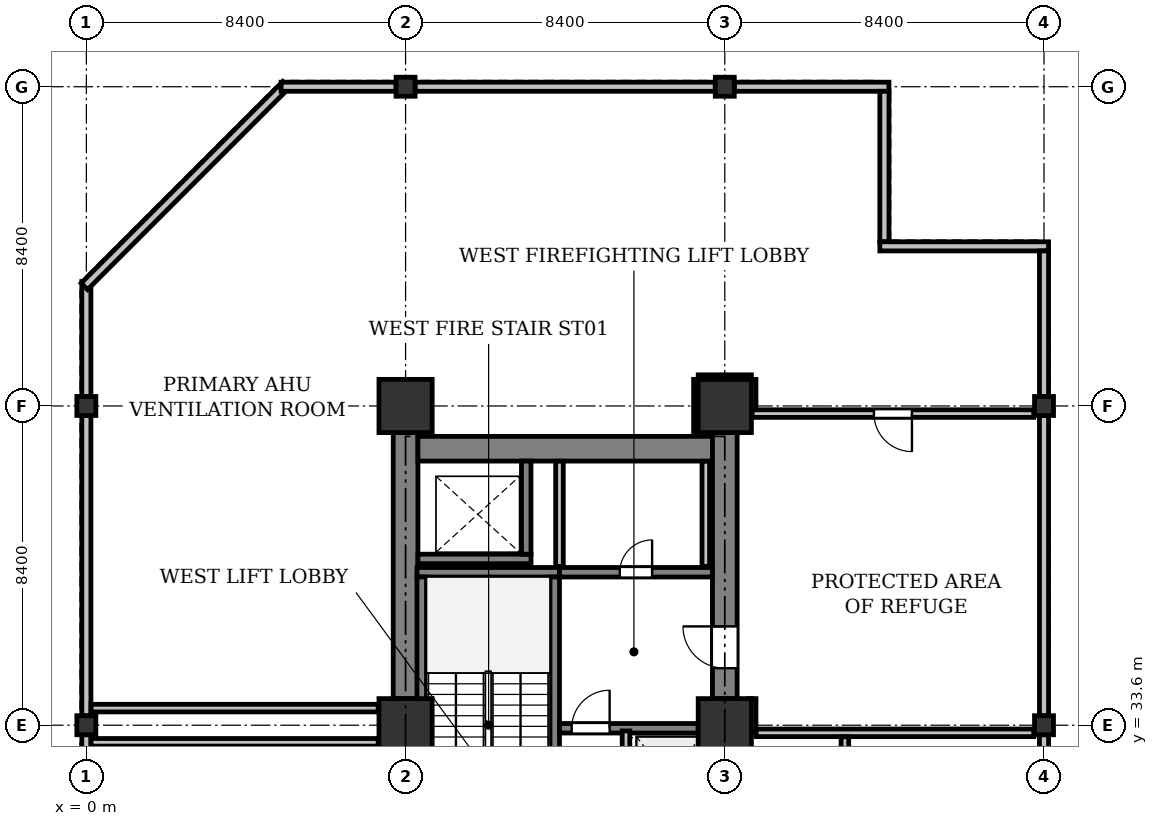
"""IFC4 building model, lengths in metres.
Left out: names, types, materials, properties, quantities, classifications, styles, units other than length and angle.
Written with IfcOpenShell. Run it as: python <this file> out.ifc"""

import sys

from ifc_helpers import new_model, si_unit, direction, frame, frame_2d, origin, origin_2d, place, context, subcontext, project, spatial, rectangle, i_section, extrude, element, fill, save


model = new_model("IFC4")
c1 = context("Model", 3, precision=1e-05, world=origin(), true_north=direction((0.0, 1.0)))
c2 = subcontext(c1, "Body", "Model", "MODEL_VIEW")
j1 = project(units=[si_unit("LENGTHUNIT", "METRE"), si_unit("PLANEANGLEUNIT", "RADIAN")], contexts=[c1])
p1 = place(None, origin())
s1 = spatial("IfcSite", under=j1, at=p1, CompositionType="ELEMENT")
p2 = place(p1, origin())
s2 = spatial("IfcBuilding", under=s1, at=p2, CompositionType="ELEMENT")
p3 = place(p2, frame((0.0, 0.0, 79.4)))
s3 = spatial("IfcBuildingStorey", under=s2, at=p3, CompositionType="ELEMENT", Elevation=79.4)
for number, where, z_axis, x_axis in (
    (1, (0.0, 33.6, 0.0), (0.0, 0.0, 1.0), (1.0, 0.0, 0.0)),
    (2, (0.0, 42.0, 0.0), (0.0, 0.0, 1.0), (1.0, 0.0, 0.0)),
):
    element("IfcColumn", number, at=place(p3, frame(where, z_axis=z_axis, x_axis=x_axis)), inside=s3, PredefinedType="COLUMN", context=c2, shape_type="SweptSolid", body=[
        extrude(i_section(OverallWidth=0.5, OverallDepth=0.5, WebThickness=0.028, FlangeThickness=0.04, at=origin_2d()), origin(), (0.0, 0.0, 1.0), 5.0),
    ])
for number, where, z_axis, x_axis in (
    (3, (8.4, 33.6, 0.0), (0.0, 0.0, 1.0), (1.0, 0.0, 0.0)),
    (4, (8.4, 42.0, 0.0), (0.0, 0.0, 1.0), (1.0, 0.0, 0.0)),
):
    element("IfcColumn", number, at=place(p3, frame(where, z_axis=z_axis, x_axis=x_axis)), inside=s3, PredefinedType="COLUMN", context=c2, shape_type="SweptSolid", body=[
        extrude(rectangle(XDim=1.4, YDim=1.4, at=origin_2d()), origin(), (0.0, 0.0, 1.0), 5.0),
    ])
p4 = place(p3, frame((8.4, 50.4, 0.0), z_axis=(0.0, 0.0, 1.0), x_axis=(1.0, 0.0, 0.0)))
e5 = element("IfcColumn", 5, at=p4, inside=s3, PredefinedType="COLUMN", context=c2, shape_type="SweptSolid", body=[
    extrude(i_section(OverallWidth=0.5, OverallDepth=0.5, WebThickness=0.028, FlangeThickness=0.04, at=origin_2d()), origin(), (0.0, 0.0, 1.0), 5.0),
])
for number, where, z_axis, x_axis in (
    (6, (16.8, 33.6, 0.0), (0.0, 0.0, 1.0), (1.0, 0.0, 0.0)),
    (7, (16.8, 42.0, 0.0), (0.0, 0.0, 1.0), (1.0, 0.0, 0.0)),
):
    element("IfcColumn", number, at=place(p3, frame(where, z_axis=z_axis, x_axis=x_axis)), inside=s3, PredefinedType="COLUMN", context=c2, shape_type="SweptSolid", body=[
        extrude(rectangle(XDim=1.4, YDim=1.4, at=origin_2d()), origin(), (0.0, 0.0, 1.0), 5.0),
    ])
for number, where, z_axis, x_axis in (
    (8, (16.8, 50.4, 0.0), (0.0, 0.0, 1.0), (1.0, 0.0, 0.0)),
    (9, (25.2, 33.6, 0.0), (0.0, 0.0, 1.0), (1.0, 0.0, 0.0)),
    (10, (25.2, 42.0, 0.0), (0.0, 0.0, 1.0), (1.0, 0.0, 0.0)),
):
    element("IfcColumn", number, at=place(p3, frame(where, z_axis=z_axis, x_axis=x_axis)), inside=s3, PredefinedType="COLUMN", context=c2, shape_type="SweptSolid", body=[
        extrude(i_section(OverallWidth=0.5, OverallDepth=0.5, WebThickness=0.028, FlangeThickness=0.04, at=origin_2d()), origin(), (0.0, 0.0, 1.0), 5.0),
    ])
p5 = place(p3, frame((0.0, 25.45, 0.0), z_axis=(0.0, 0.0, 1.0), x_axis=(0.0, 1.0, 0.0)))
e11 = element("IfcWall", 11, at=p5, inside=s3, PredefinedType="STANDARD", context=c2, shape_type="SweptSolid", body=[
    extrude(rectangle(XDim=7.9, YDim=0.24, at=frame_2d((3.95, 0.0))), origin(), (0.0, 0.0, 1.0), 4.425),
])
p6 = place(p3, frame((0.0, 33.85, 0.0), z_axis=(0.0, 0.0, 1.0), x_axis=(0.0, 1.0, 0.0)))
e12 = element("IfcWall", 12, at=p6, inside=s3, PredefinedType="STANDARD", context=c2, shape_type="SweptSolid", body=[
    extrude(rectangle(XDim=7.9, YDim=0.24, at=frame_2d((3.95, 0.0))), origin(), (0.0, 0.0, 1.0), 4.425),
])
p7 = place(p3, frame((0.0, 42.25, 0.0), z_axis=(0.0, 0.0, 1.0), x_axis=(0.0, 1.0, 0.0)))
e13 = element("IfcWall", 13, at=p7, inside=s3, PredefinedType="STANDARD", context=c2, shape_type="SweptSolid", body=[
    extrude(rectangle(XDim=3.025, YDim=0.24, at=frame_2d((1.512, 0.0))), origin(), (0.0, 0.0, 1.0), 4.725),
])
p8 = place(p3, frame((-0.053, 45.147, 0.0), z_axis=(0.0, 0.0, 1.0), x_axis=(0.707090511833, 0.707123050166, 0.0)))
e14 = element("IfcWall", 14, at=p8, inside=s3, PredefinedType="STANDARD", context=c2, shape_type="SweptSolid", body=[
    extrude(rectangle(XDim=7.503, YDim=0.24, at=frame_2d((3.751, 0.0))), origin(), (0.0, 0.0, 1.0), 4.725),
])
p9 = place(p3, frame((5.125, 50.4, 0.0), z_axis=(0.0, 0.0, 1.0), x_axis=(1.0, 0.0, 0.0)))
e15 = element("IfcWall", 15, at=p9, inside=s3, PredefinedType="STANDARD", context=c2, shape_type="SweptSolid", body=[
    extrude(rectangle(XDim=3.025, YDim=0.24, at=frame_2d((1.512, 0.0))), origin(), (0.0, 0.0, 1.0), 4.725),
])
p10 = place(p3, frame((8.65, 50.4, 0.0), z_axis=(0.0, 0.0, 1.0), x_axis=(1.0, 0.0, 0.0)))
e16 = element("IfcWall", 16, at=p10, inside=s3, PredefinedType="STANDARD", context=c2, shape_type="SweptSolid", body=[
    extrude(rectangle(XDim=7.9, YDim=0.24, at=frame_2d((3.95, 0.0))), origin(), (0.0, 0.0, 1.0), 4.425),
])
p11 = place(p3, frame((17.05, 50.4, 0.0), z_axis=(0.0, 0.0, 1.0), x_axis=(1.0, 0.0, 0.0)))
e17 = element("IfcWall", 17, at=p11, inside=s3, PredefinedType="STANDARD", context=c2, shape_type="SweptSolid", body=[
    extrude(rectangle(XDim=4.07, YDim=0.24, at=frame_2d((2.035, 0.0))), origin(), (0.0, 0.0, 1.0), 4.725),
])
p12 = place(p3, frame((21.0, 50.28, 0.0), z_axis=(0.0, 0.0, 1.0), x_axis=(0.0, -1.0, 0.0)))
e18 = element("IfcWall", 18, at=p12, inside=s3, PredefinedType="STANDARD", context=c2, shape_type="SweptSolid", body=[
    extrude(rectangle(XDim=3.96, YDim=0.24, at=frame_2d((1.98, 0.0))), origin(), (0.0, 0.0, 1.0), 4.725),
])
p13 = place(p3, frame((20.88, 46.2, 0.0), z_axis=(0.0, 0.0, 1.0), x_axis=(1.0, 0.0, 0.0)))
e19 = element("IfcWall", 19, at=p13, inside=s3, PredefinedType="STANDARD", context=c2, shape_type="SweptSolid", body=[
    extrude(rectangle(XDim=4.44, YDim=0.24, at=frame_2d((2.22, 0.0))), origin(), (0.0, 0.0, 1.0), 4.725),
])
p14 = place(p3, frame((25.2, 46.08, 0.0), z_axis=(0.0, 0.0, 1.0), x_axis=(0.0, -1.0, 0.0)))
e20 = element("IfcWall", 20, at=p14, inside=s3, PredefinedType="STANDARD", context=c2, shape_type="SweptSolid", body=[
    extrude(rectangle(XDim=3.83, YDim=0.24, at=frame_2d((1.915, 0.0))), origin(), (0.0, 0.0, 1.0), 4.725),
])
p15 = place(p3, frame((25.2, 41.75, 0.0), z_axis=(0.0, 0.0, 1.0), x_axis=(0.0, -1.0, 0.0)))
e21 = element("IfcWall", 21, at=p15, inside=s3, PredefinedType="STANDARD", context=c2, shape_type="SweptSolid", body=[
    extrude(rectangle(XDim=7.9, YDim=0.24, at=frame_2d((3.95, 0.0))), origin(), (0.0, 0.0, 1.0), 3.709),
])
p16 = place(p3, frame((25.2, 33.35, 0.0), z_axis=(0.0, 0.0, 1.0), x_axis=(0.0, -1.0, 0.0)))
e22 = element("IfcWall", 22, at=p16, inside=s3, PredefinedType="STANDARD", context=c2, shape_type="SweptSolid", body=[
    extrude(rectangle(XDim=7.9, YDim=0.24, at=frame_2d((3.95, 0.0))), origin(), (0.0, 0.0, 1.0), 3.709),
])
p17 = place(p3, frame((8.4, 34.3, 0.0), z_axis=(0.0, 0.0, 1.0), x_axis=(0.0, 1.0, 0.0)))
e23 = element("IfcWall", 23, at=p17, inside=s3, PredefinedType="SHEAR", context=c2, shape_type="SweptSolid", body=[
    extrude(rectangle(XDim=7.0, YDim=0.65, at=frame_2d((3.5, 0.0))), origin(), (0.0, 0.0, 1.0), 4.725),
])
p18 = place(p3, frame((8.725, 40.875, 0.0), z_axis=(0.0, 0.0, 1.0), x_axis=(1.0, 0.0, 0.0)))
e24 = element("IfcWall", 24, at=p18, inside=s3, PredefinedType="SHEAR", context=c2, shape_type="SweptSolid", body=[
    extrude(rectangle(XDim=7.75, YDim=0.65, at=frame_2d((3.875, 0.0))), origin(), (0.0, 0.0, 1.0), 4.725),
])
p19 = place(p3, frame((16.8, 34.3, 0.0), z_axis=(0.0, 0.0, 1.0), x_axis=(0.0, 1.0, 0.0)))
e25 = element("IfcWall", 25, at=p19, inside=s3, PredefinedType="SHEAR", context=c2, shape_type="SweptSolid", body=[
    extrude(rectangle(XDim=7.0, YDim=0.65, at=frame_2d((3.5, 0.0))), origin(), (0.0, 0.0, 1.0), 4.725),
])
p20 = place(p19, frame((0.8, 0.0, 0.0)))
e26 = element("IfcOpeningElement", 26, at=p20, cuts=e25, PredefinedType="OPENING", context=c2, shape_type="SweptSolid", body=[
    extrude(rectangle(XDim=1.1, YDim=2.15, at=frame_2d((0.55, 1.075))), frame((0.0, 0.335, 0.0), z_axis=(0.0, -1.0, 0.0), x_axis=(1.0, 0.0, 0.0)), (0.0, 0.0, 1.0), 0.67),
])
p21 = place(p3, frame((12.45, 37.625, 0.0), z_axis=(0.0, 0.0, 1.0), x_axis=(-1.0, 0.0, 0.0)))
e27 = element("IfcWall", 27, at=p21, inside=s3, PredefinedType="SHEAR", context=c2, shape_type="SweptSolid", body=[
    extrude(rectangle(XDim=3.75, YDim=0.25, at=frame_2d((1.875, 0.0))), origin(), (0.0, 0.0, 1.0), 4.725),
])
p22 = place(p3, frame((12.325, 29.75, 0.0), z_axis=(0.0, 0.0, 1.0), x_axis=(0.0, 1.0, 0.0)))
e28 = element("IfcWall", 28, at=p22, inside=s3, PredefinedType="SHEAR", context=c2, shape_type="SweptSolid", body=[
    extrude(rectangle(XDim=7.75, YDim=0.25, at=frame_2d((3.875, 0.0))), origin(), (0.0, 0.0, 1.0), 4.725),
])
p23 = place(p22, frame((0.22, 0.0, 0.0)))
e29 = element("IfcOpeningElement", 29, at=p23, cuts=e28, PredefinedType="OPENING", context=c2, shape_type="SweptSolid", body=[
    extrude(rectangle(XDim=1.1, YDim=2.15, at=frame_2d((0.55, 1.075))), frame((0.0, 0.135, 0.0), z_axis=(0.0, -1.0, 0.0), x_axis=(1.0, 0.0, 0.0)), (0.0, 0.0, 1.0), 0.27),
])
p24 = place(p3, frame((8.825, 29.75, 0.0), z_axis=(0.0, 0.0, 1.0), x_axis=(0.0, 1.0, 0.0)))
e30 = element("IfcWall", 30, at=p24, inside=s3, PredefinedType="SHEAR", context=c2, shape_type="SweptSolid", body=[
    extrude(rectangle(XDim=7.75, YDim=0.25, at=frame_2d((3.875, 0.0))), origin(), (0.0, 0.0, 1.0), 4.725),
])
p25 = place(p3, frame((8.725, 37.975, 0.0), z_axis=(0.0, 0.0, 1.0), x_axis=(1.0, 0.0, 0.0)))
e31 = element("IfcWall", 31, at=p25, inside=s3, PredefinedType="SHEAR", context=c2, shape_type="SweptSolid", body=[
    extrude(rectangle(XDim=2.975, YDim=0.25, at=frame_2d((1.487, 0.0))), origin(), (0.0, 0.0, 1.0), 4.725),
])
p26 = place(p3, frame((11.575, 38.1, 0.0), z_axis=(0.0, 0.0, 1.0), x_axis=(0.0, 1.0, 0.0)))
e32 = element("IfcWall", 32, at=p26, inside=s3, PredefinedType="SHEAR", context=c2, shape_type="SweptSolid", body=[
    extrude(rectangle(XDim=2.45, YDim=0.25, at=frame_2d((1.225, 0.0))), origin(), (0.0, 0.0, 1.0), 4.725),
])
p27 = place(p3, frame((12.45, 33.52, 0.0), z_axis=(0.0, 0.0, 1.0), x_axis=(1.0, 0.0, 0.0)))
e33 = element("IfcWall", 33, at=p27, inside=s3, PredefinedType="SHEAR", context=c2, shape_type="SweptSolid", body=[
    extrude(rectangle(XDim=3.65, YDim=0.25, at=frame_2d((1.825, 0.0))), origin(), (0.0, 0.0, 1.0), 4.725),
])
p28 = place(p27, frame((0.32, 0.0, 0.0)))
e34 = element("IfcOpeningElement", 34, at=p28, cuts=e33, PredefinedType="OPENING", context=c2, shape_type="SweptSolid", body=[
    extrude(rectangle(XDim=1.0, YDim=2.15, at=frame_2d((0.5, 1.075))), frame((0.0, 0.135, 0.0), z_axis=(0.0, -1.0, 0.0), x_axis=(1.0, 0.0, 0.0)), (0.0, 0.0, 1.0), 0.27),
])
p29 = place(p3, frame((12.45, 37.625, 0.0), z_axis=(0.0, 0.0, 1.0), x_axis=(1.0, 0.0, 0.0)))
e35 = element("IfcWall", 35, at=p29, inside=s3, PredefinedType="SHEAR", context=c2, shape_type="SweptSolid", body=[
    extrude(rectangle(XDim=4.025, YDim=0.25, at=frame_2d((2.013, 0.0))), origin(), (0.0, 0.0, 1.0), 4.725),
])
p30 = place(p29, frame((1.587, 0.0, 0.0)))
e36 = element("IfcOpeningElement", 36, at=p30, cuts=e35, PredefinedType="OPENING", context=c2, shape_type="SweptSolid", body=[
    extrude(rectangle(XDim=0.85, YDim=2.15, at=frame_2d((0.425, 1.075))), frame((0.0, 0.135, 0.0), z_axis=(0.0, -1.0, 0.0), x_axis=(1.0, 0.0, 0.0)), (0.0, 0.0, 1.0), 0.27),
])
p31 = place(p3, frame((14.2, 30.95, 0.0), z_axis=(0.0, 0.0, 1.0), x_axis=(0.0, 1.0, 0.0)))
e37 = element("IfcWall", 37, at=p31, inside=s3, PredefinedType="PARTITIONING", context=c2, shape_type="SweptSolid", body=[
    extrude(rectangle(XDim=2.5, YDim=0.2, at=frame_2d((1.25, 0.0))), origin(), (0.0, 0.0, 1.0), 4.725),
])
p32 = place(p31, frame((0.7, 0.0, 0.0)))
e38 = element("IfcOpeningElement", 38, at=p32, cuts=e37, PredefinedType="OPENING", context=c2, shape_type="SweptSolid", body=[
    extrude(rectangle(XDim=1.1, YDim=2.2, at=frame_2d((0.55, 1.1))), frame((0.0, 0.11, 0.0), z_axis=(0.0, -1.0, 0.0), x_axis=(1.0, 0.0, 0.0)), (0.0, 0.0, 1.0), 0.22),
])
p33 = place(p3, frame((16.45, 31.05, 0.0), z_axis=(0.0, 0.0, 1.0), x_axis=(0.0, 1.0, 0.0)))
e39 = element("IfcWall", 39, at=p33, inside=s3, PredefinedType="PARTITIONING", context=c2, shape_type="SweptSolid", body=[
    extrude(rectangle(XDim=2.3, YDim=0.2, at=frame_2d((1.15, 0.0))), origin(), (0.0, 0.0, 1.0), 4.725),
])
for number, where, z_axis, x_axis in (
    (40, (16.3, 37.78, 0.0), (0.0, 0.0, 1.0), (0.0, 1.0, 0.0)),
    (41, (12.45, 40.546, 0.0), (0.0, 0.0, 1.0), (0.0, -1.0, 0.0)),
):
    element("IfcWall", number, at=place(p3, frame(where, z_axis=z_axis, x_axis=x_axis)), inside=s3, PredefinedType="PARTITIONING", context=c2, shape_type="SweptSolid", body=[
        extrude(rectangle(XDim=2.766, YDim=0.2, at=frame_2d((1.383, 0.0))), origin(), (0.0, 0.0, 1.0), 3.625),
    ])
p34 = place(p3, frame((17.52, 34.3, 0.0), z_axis=(0.0, 0.0, 1.0), x_axis=(0.0, -1.0, 0.0)))
e42 = element("IfcWall", 42, at=p34, inside=s3, PredefinedType="PARTITIONING", context=c2, shape_type="SweptSolid", body=[
    extrude(rectangle(XDim=0.9, YDim=0.2, at=frame_2d((0.45, 0.0))), origin(), (0.0, 0.0, 1.0), 3.825),
])
p35 = place(p3, frame((17.624, 33.4, 0.0), z_axis=(0.0, 0.0, 1.0), x_axis=(1.0, 0.0, 0.0)))
e43 = element("IfcWall", 43, at=p35, inside=s3, PredefinedType="PARTITIONING", context=c2, shape_type="SweptSolid", body=[
    extrude(rectangle(XDim=7.306, YDim=0.2, at=frame_2d((3.653, 0.0))), origin(), (0.0, 0.0, 1.0), 3.825),
])
p36 = place(p3, frame((24.93, 41.8, 0.0), z_axis=(0.0, 0.0, 1.0), x_axis=(-1.0, 0.0, 0.0)))
e44 = element("IfcWall", 44, at=p36, inside=s3, PredefinedType="PARTITIONING", context=c2, shape_type="SweptSolid", body=[
    extrude(rectangle(XDim=7.41, YDim=0.2, at=frame_2d((3.705, 0.0))), origin(), (0.0, 0.0, 1.0), 3.825),
])
p37 = place(p36, frame((3.205, 0.0, 0.0)))
e45 = element("IfcOpeningElement", 45, at=p37, cuts=e44, PredefinedType="OPENING", context=c2, shape_type="SweptSolid", body=[
    extrude(rectangle(XDim=1.0, YDim=2.15, at=frame_2d((0.5, 1.075))), frame((0.0, 0.11, 0.0), z_axis=(0.0, -1.0, 0.0), x_axis=(1.0, 0.0, 0.0)), (0.0, 0.0, 1.0), 0.22),
])
for number, where, z_axis, x_axis in (
    (46, (7.68, 33.15, 0.0), (0.0, 0.0, 1.0), (-1.0, 0.0, 0.0)),
    (47, (0.124, 34.05, 0.0), (0.0, 0.0, 1.0), (1.0, 0.0, 0.0)),
):
    element("IfcWall", number, at=place(p3, frame(where, z_axis=z_axis, x_axis=x_axis)), inside=s3, PredefinedType="PARTITIONING", context=c2, shape_type="SweptSolid", body=[
        extrude(rectangle(XDim=7.556, YDim=0.2, at=frame_2d((3.778, 0.0))), origin(), (0.0, 0.0, 1.0), 4.322),
    ])
p38 = place(p3, frame((16.08, 41.3, 0.0), z_axis=(0.0, 0.0, 1.0), x_axis=(0.0, 1.0, 0.0)))
e48 = element("IfcWall", 48, at=p38, inside=s3, PredefinedType="PARTITIONING", context=c2, shape_type="SweptSolid", body=[
    extrude(rectangle(XDim=1.4, YDim=0.2, at=frame_2d((0.7, 0.0))), origin(), (0.0, 0.0, 1.0), 3.825),
])
p39 = place(p3, frame((16.1, 42.72, 0.0), z_axis=(0.0, 0.0, 1.0), x_axis=(1.0, 0.0, 0.0)))
e49 = element("IfcWall", 49, at=p39, inside=s3, PredefinedType="PARTITIONING", context=c2, shape_type="SweptSolid", body=[
    extrude(rectangle(XDim=1.4, YDim=0.2, at=frame_2d((0.7, 0.0))), origin(), (0.0, 0.0, 1.0), 3.709),
])
p40 = place(p3, frame((17.52, 42.7, 0.0), z_axis=(0.0, 0.0, 1.0), x_axis=(0.0, -1.0, 0.0)))
e50 = element("IfcWall", 50, at=p40, inside=s3, PredefinedType="PARTITIONING", context=c2, shape_type="SweptSolid", body=[
    extrude(rectangle(XDim=0.796, YDim=0.2, at=frame_2d((0.398, 0.0))), origin(), (0.0, 0.0, 1.0), 3.825),
])
p41 = place(p3, frame((19.96, 33.296, 0.0), z_axis=(0.0, 0.0, 1.0), x_axis=(0.0, -1.0, 0.0)))
e51 = element("IfcWall", 51, at=p41, inside=s3, PredefinedType="PARTITIONING", context=c2, shape_type="SweptSolid", body=[
    extrude(rectangle(XDim=13.336, YDim=0.2, at=frame_2d((6.668, 0.0))), origin(), (0.0, 0.0, 1.0), 3.825),
])
p42 = place(p41, frame((6.168, 0.0, 0.0)))
e52 = element("IfcOpeningElement", 52, at=p42, cuts=e51, PredefinedType="OPENING", context=c2, shape_type="SweptSolid", body=[
    extrude(rectangle(XDim=1.0, YDim=2.15, at=frame_2d((0.5, 1.075))), frame((0.0, 0.11, 0.0), z_axis=(0.0, -1.0, 0.0), x_axis=(1.0, 0.0, 0.0)), (0.0, 0.0, 1.0), 0.22),
])
p43 = place(p20, origin())
e53 = element("IfcDoor", 53, at=p43, inside=s3, OperationType="SINGLE_SWING_RIGHT", PredefinedType="DOOR", context=c2, shape_type="SweptSolid", body=[
    extrude(rectangle(XDim=1.1, YDim=2.15, at=frame_2d((0.55, 1.075))), frame((0.0, 0.025, 0.0), z_axis=(0.0, -1.0, 0.0), x_axis=(1.0, 0.0, 0.0)), (0.0, 0.0, 1.0), 0.05),
])
fill(e26, e53)
p44 = place(p28, origin())
e54 = element("IfcDoor", 54, at=p44, inside=s3, OperationType="SINGLE_SWING_RIGHT", PredefinedType="DOOR", context=c2, shape_type="SweptSolid", body=[
    extrude(rectangle(XDim=1.0, YDim=2.15, at=frame_2d((0.5, 1.075))), frame((0.0, 0.025, 0.0), z_axis=(0.0, -1.0, 0.0), x_axis=(1.0, 0.0, 0.0)), (0.0, 0.0, 1.0), 0.05),
])
fill(e34, e54)
p45 = place(p30, origin())
e55 = element("IfcDoor", 55, at=p45, inside=s3, OperationType="SINGLE_SWING_RIGHT", PredefinedType="DOOR", context=c2, shape_type="SweptSolid", body=[
    extrude(rectangle(XDim=0.85, YDim=2.15, at=frame_2d((0.425, 1.075))), frame((0.0, 0.025, 0.0), z_axis=(0.0, -1.0, 0.0), x_axis=(1.0, 0.0, 0.0)), (0.0, 0.0, 1.0), 0.05),
])
fill(e36, e55)
p46 = place(p37, origin())
e56 = element("IfcDoor", 56, at=p46, inside=s3, OperationType="SINGLE_SWING_LEFT", PredefinedType="DOOR", context=c2, shape_type="SweptSolid", body=[
    extrude(rectangle(XDim=1.0, YDim=2.15, at=frame_2d((0.5, 1.075))), frame((0.0, 0.025, 0.0), z_axis=(0.0, -1.0, 0.0), x_axis=(1.0, 0.0, 0.0)), (0.0, 0.0, 1.0), 0.05),
])
fill(e45, e56)
save(model, sys.argv[1])
